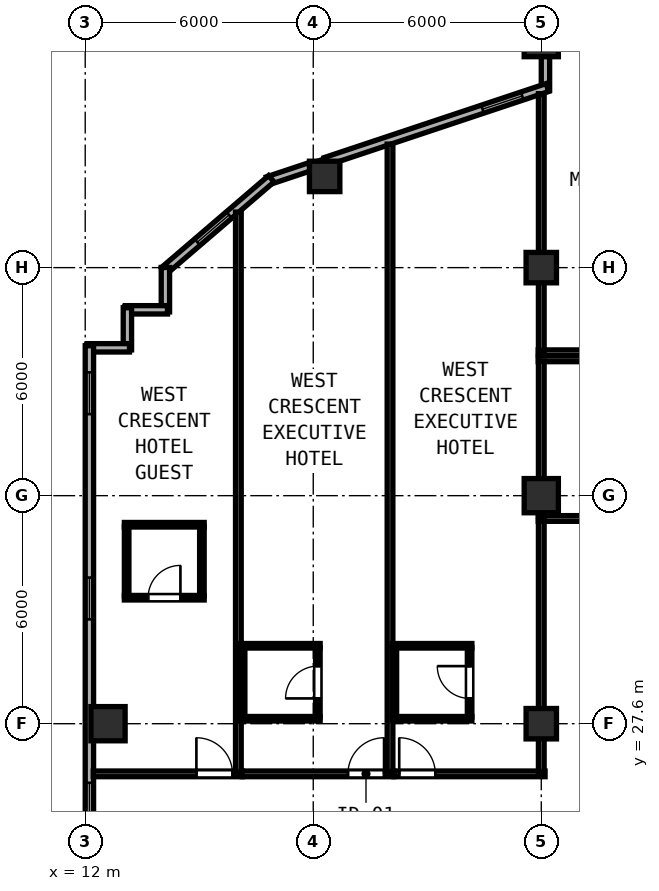
"""IFC4 building model, lengths in metres.
Left out: names, types, materials, properties, quantities, classifications, styles, units other than length and angle.
Written with IfcOpenShell. Run it as: python <this file> out.ifc"""

import sys

from ifc_helpers import new_model, si_unit, direction, frame, frame_2d, origin, origin_2d, place, context, subcontext, project, spatial, rectangle, hollow_rectangle, extrude, element, fill, save


model = new_model("IFC4")
c1 = context("Model", 3, precision=1e-05, world=origin(), true_north=direction((0.0, 1.0)))
c2 = subcontext(c1, "Body", "Model", "MODEL_VIEW")
j1 = project(units=[si_unit("LENGTHUNIT", "METRE"), si_unit("PLANEANGLEUNIT", "RADIAN")], contexts=[c1])
p1 = place(None, origin())
s1 = spatial("IfcSite", under=j1, at=p1, CompositionType="ELEMENT")
p2 = place(p1, origin())
s2 = spatial("IfcBuilding", under=s1, at=p2, CompositionType="ELEMENT")
p3 = place(p2, frame((0.0, 0.0, 191.8)))
s3 = spatial("IfcBuildingStorey", under=s2, at=p3, CompositionType="ELEMENT", Elevation=191.8)
for number, where, z_axis, x_axis in (
    (1, (24.0, 33.6, 0.0), (0.0, 0.0, 1.0), (1.0, 0.0, 0.0)),
    (2, (24.0, 45.6, 0.0), (0.0, 0.0, 1.0), (1.0, 0.0, 0.0)),
    (3, (12.6, 27.6, 0.0), (0.0, 0.0, 1.0), (1.0, 0.0, 0.0)),
):
    element("IfcColumn", number, at=place(p3, frame(where, z_axis=z_axis, x_axis=x_axis)), inside=s3, PredefinedType="COLUMN", context=c2, shape_type="SweptSolid", body=[
        extrude(hollow_rectangle(XDim=0.9, YDim=0.9, WallThickness=0.034, at=origin_2d()), origin(), (0.0, 0.0, 1.0), 3.8),
    ])
for number, where, z_axis, x_axis in (
    (4, (24.0, 27.6, 0.0), (0.0, 0.0, 1.0), (1.0, 0.0, 0.0)),
    (5, (24.0, 39.6, 0.0), (0.0, 0.0, 1.0), (1.0, 0.0, 0.0)),
    (6, (18.3, 42.0, 0.0), (0.0, 0.0, 1.0), (1.0, 0.0, 0.0)),
):
    element("IfcColumn", number, at=place(p3, frame(where, z_axis=z_axis, x_axis=x_axis)), inside=s3, PredefinedType="COLUMN", context=c2, shape_type="SweptSolid", body=[
        extrude(hollow_rectangle(XDim=0.8, YDim=0.8, WallThickness=0.03, at=origin_2d()), origin(), (0.0, 0.0, 1.0), 3.8),
    ])
p4 = place(p3, frame((24.11, 45.158, 0.0), z_axis=(0.0, 0.0, 1.0), x_axis=(0.0, -1.0, 0.0)))
e7 = element("IfcWall", 7, at=p4, inside=s3, PredefinedType="SOLIDWALL", context=c2, shape_type="SweptSolid", body=[
    extrude(rectangle(XDim=0.892, YDim=0.22, at=frame_2d((0.446, 0.0))), origin(), (0.0, 0.0, 1.0), 3.215),
])
p5 = place(p3, frame((24.162, 44.338, 0.0), z_axis=(0.0, 0.0, 1.0), x_axis=(-0.948687265055, -0.316215864755, 0.0)))
e8 = element("IfcWall", 8, at=p5, inside=s3, PredefinedType="SOLIDWALL", context=c2, shape_type="SweptSolid", body=[
    extrude(rectangle(XDim=6.154, YDim=0.22, at=frame_2d((3.077, 0.0))), origin(), (0.0, 0.0, 1.0), 3.215),
])
p6 = place(p5, frame((0.7, 0.0, 0.85)))
e9 = element("IfcOpeningElement", 9, at=p6, cuts=e8, PredefinedType="OPENING", context=c2, shape_type="SweptSolid", body=[
    extrude(rectangle(XDim=1.1, YDim=1.75, at=frame_2d((0.55, 0.875))), frame((0.0, 0.12, 0.0), z_axis=(0.0, -1.0, 0.0), x_axis=(1.0, 0.0, 0.0)), (0.0, 0.0, 1.0), 0.24),
])
p7 = place(p3, frame((17.908, 42.253, 0.0), z_axis=(0.0, 0.0, 1.0), x_axis=(-0.948662335685, -0.316290646166, 0.0)))
e10 = element("IfcWall", 10, at=p7, inside=s3, PredefinedType="SOLIDWALL", context=c2, shape_type="SweptSolid", body=[
    extrude(rectangle(XDim=1.165, YDim=0.22, at=frame_2d((0.583, 0.0))), origin(), (0.0, 0.0, 1.0), 3.62),
])
p8 = place(p3, frame((16.897, 41.938, 0.0), z_axis=(0.0, 0.0, 1.0), x_axis=(-0.759279729622, -0.650764390686, 0.0)))
e11 = element("IfcWall", 11, at=p8, inside=s3, PredefinedType="SOLIDWALL", context=c2, shape_type="SweptSolid", body=[
    extrude(rectangle(XDim=3.726, YDim=0.22, at=frame_2d((1.863, 0.0))), origin(), (0.0, 0.0, 1.0), 3.62),
])
p9 = place(p8, frame((1.464, 0.0, 0.85)))
e12 = element("IfcOpeningElement", 12, at=p9, cuts=e11, PredefinedType="OPENING", context=c2, shape_type="SweptSolid", body=[
    extrude(rectangle(XDim=1.1, YDim=1.75, at=frame_2d((0.55, 0.875))), frame((0.0, 0.12, 0.0), z_axis=(0.0, -1.0, 0.0), x_axis=(1.0, 0.0, 0.0)), (0.0, 0.0, 1.0), 0.24),
])
p10 = place(p3, frame((14.11, 39.604, 0.0), z_axis=(0.0, 0.0, 1.0), x_axis=(0.0, -1.0, 0.0)))
e13 = element("IfcWall", 13, at=p10, inside=s3, PredefinedType="SOLIDWALL", context=c2, shape_type="SweptSolid", body=[
    extrude(rectangle(XDim=1.169, YDim=0.22, at=frame_2d((0.585, 0.0))), origin(), (0.0, 0.0, 1.0), 3.62),
])
p11 = place(p3, frame((14.165, 38.49, 0.0), z_axis=(0.0, 0.0, 1.0), x_axis=(-1.0, 0.0, 0.0)))
e14 = element("IfcWall", 14, at=p11, inside=s3, PredefinedType="SOLIDWALL", context=c2, shape_type="SweptSolid", body=[
    extrude(rectangle(XDim=1.11, YDim=0.22, at=frame_2d((0.555, 0.0))), origin(), (0.0, 0.0, 1.0), 3.62),
])
p12 = place(p3, frame((13.11, 38.545, 0.0), z_axis=(0.0, 0.0, 1.0), x_axis=(0.0, -1.0, 0.0)))
e15 = element("IfcWall", 15, at=p12, inside=s3, PredefinedType="SOLIDWALL", context=c2, shape_type="SweptSolid", body=[
    extrude(rectangle(XDim=1.11, YDim=0.22, at=frame_2d((0.555, 0.0))), origin(), (0.0, 0.0, 1.0), 3.62),
])
p13 = place(p3, frame((13.165, 37.49, 0.0), z_axis=(0.0, 0.0, 1.0), x_axis=(-1.0, 0.0, 0.0)))
e16 = element("IfcWall", 16, at=p13, inside=s3, PredefinedType="SOLIDWALL", context=c2, shape_type="SweptSolid", body=[
    extrude(rectangle(XDim=1.11, YDim=0.22, at=frame_2d((0.555, 0.0))), origin(), (0.0, 0.0, 1.0), 3.62),
])
p14 = place(p3, frame((12.11, 37.545, 0.0), z_axis=(0.0, 0.0, 1.0), x_axis=(0.0, -1.0, 0.0)))
e17 = element("IfcWall", 17, at=p14, inside=s3, PredefinedType="SOLIDWALL", context=c2, shape_type="SweptSolid", body=[
    extrude(rectangle(XDim=21.145, YDim=0.22, at=frame_2d((10.573, 0.0))), origin(), (0.0, 0.0, 1.0), 3.62),
])
p15 = place(p14, frame((0.7, 0.0, 0.85)))
e18 = element("IfcOpeningElement", 18, at=p15, cuts=e17, PredefinedType="OPENING", context=c2, shape_type="SweptSolid", body=[
    extrude(rectangle(XDim=1.1, YDim=1.75, at=frame_2d((0.55, 0.875))), frame((0.0, 0.12, 0.0), z_axis=(0.0, -1.0, 0.0), x_axis=(1.0, 0.0, 0.0)), (0.0, 0.0, 1.0), 0.24),
])
p16 = place(p14, frame((6.1, 0.0, 0.85)))
e19 = element("IfcOpeningElement", 19, at=p16, cuts=e17, PredefinedType="OPENING", context=c2, shape_type="SweptSolid", body=[
    extrude(rectangle(XDim=1.1, YDim=1.75, at=frame_2d((0.55, 0.875))), frame((0.0, 0.12, 0.0), z_axis=(0.0, -1.0, 0.0), x_axis=(1.0, 0.0, 0.0)), (0.0, 0.0, 1.0), 0.24),
])
p17 = place(p14, frame((11.5, 0.0, 0.85)))
e20 = element("IfcOpeningElement", 20, at=p17, cuts=e17, PredefinedType="OPENING", context=c2, shape_type="SweptSolid", body=[
    extrude(rectangle(XDim=1.1, YDim=1.75, at=frame_2d((0.55, 0.875))), frame((0.0, 0.12, 0.0), z_axis=(0.0, -1.0, 0.0), x_axis=(1.0, 0.0, 0.0)), (0.0, 0.0, 1.0), 0.24),
])
p18 = place(p14, frame((16.9, 0.0, 0.85)))
e21 = element("IfcOpeningElement", 21, at=p18, cuts=e17, PredefinedType="OPENING", context=c2, shape_type="SweptSolid", body=[
    extrude(rectangle(XDim=1.1, YDim=1.75, at=frame_2d((0.55, 0.875))), frame((0.0, 0.12, 0.0), z_axis=(0.0, -1.0, 0.0), x_axis=(1.0, 0.0, 0.0)), (0.0, 0.0, 1.0), 0.24),
])
for number, where, z_axis, x_axis in (
    (22, (23.92, 37.2, 0.0), (0.0, 0.0, 1.0), (1.0, 0.0, 0.0)),
    (23, (23.92, 33.0, 0.0), (0.0, 0.0, 1.0), (1.0, 0.0, 0.0)),
):
    element("IfcWall", number, at=place(p3, frame(where, z_axis=z_axis, x_axis=x_axis)), inside=s3, PredefinedType="PARTITIONING", context=c2, shape_type="SweptSolid", body=[
        extrude(rectangle(XDim=3.8, YDim=0.15, at=frame_2d((1.9, 0.0))), origin(), (0.0, 0.0, 1.0), 3.62),
    ])
p19 = place(p3, frame((24.0, 33.06, 0.0), z_axis=(0.0, 0.0, 1.0), x_axis=(0.0, 1.0, 0.0)))
e24 = element("IfcWall", 24, at=p19, inside=s3, PredefinedType="PARTITIONING", context=c2, shape_type="SweptSolid", body=[
    extrude(rectangle(XDim=4.08, YDim=0.15, at=frame_2d((2.04, 0.0))), origin(), (0.0, 0.0, 1.0), 3.215),
])
p20 = place(p3, frame((23.92, 37.36, 0.0), z_axis=(0.0, 0.0, 1.0), x_axis=(1.0, 0.0, 0.0)))
e25 = element("IfcWall", 25, at=p20, inside=s3, PredefinedType="PARTITIONING", context=c2, shape_type="SweptSolid", body=[
    extrude(rectangle(XDim=3.8, YDim=0.15, at=frame_2d((1.9, 0.0))), origin(), (0.0, 0.0, 1.0), 3.62),
])
p21 = place(p3, frame((24.0, 37.42, 0.0), z_axis=(0.0, 0.0, 1.0), x_axis=(0.0, 1.0, 0.0)))
e26 = element("IfcWall", 26, at=p21, inside=s3, PredefinedType="PARTITIONING", context=c2, shape_type="SweptSolid", body=[
    extrude(rectangle(XDim=6.757, YDim=0.15, at=frame_2d((3.378, 0.0))), origin(), (0.0, 0.0, 1.0), 3.215),
])
p22 = place(p3, frame((12.212, 26.28, 0.0), z_axis=(0.0, 0.0, 1.0), x_axis=(1.0, 0.0, 0.0)))
e27 = element("IfcWall", 27, at=p22, inside=s3, PredefinedType="PARTITIONING", context=c2, shape_type="SweptSolid", body=[
    extrude(rectangle(XDim=3.918, YDim=0.15, at=frame_2d((1.959, 0.0))), origin(), (0.0, 0.0, 1.0), 3.62),
])
p23 = place(p22, frame((2.713, 0.0, 0.0)))
e28 = element("IfcOpeningElement", 28, at=p23, cuts=e27, PredefinedType="OPENING", context=c2, shape_type="SweptSolid", body=[
    extrude(rectangle(XDim=0.95, YDim=2.15, at=frame_2d((0.475, 1.075))), frame((0.0, 0.085, 0.0), z_axis=(0.0, -1.0, 0.0), x_axis=(1.0, 0.0, 0.0)), (0.0, 0.0, 1.0), 0.17),
])
p24 = place(p3, frame((16.03, 26.34, 0.0), z_axis=(0.0, 0.0, 1.0), x_axis=(0.0, 1.0, 0.0)))
e29 = element("IfcWall", 29, at=p24, inside=s3, PredefinedType="PARTITIONING", context=c2, shape_type="SweptSolid", body=[
    extrude(rectangle(XDim=14.721, YDim=0.15, at=frame_2d((7.36, 0.0))), origin(), (0.0, 0.0, 1.0), 3.62),
])
p25 = place(p3, frame((13.03, 32.835, 0.0), z_axis=(0.0, 0.0, 1.0), x_axis=(1.0, 0.0, 0.0)))
e30 = element("IfcWall", 30, at=p25, inside=s3, PredefinedType="PARTITIONING", context=c2, shape_type="SweptSolid", body=[
    extrude(rectangle(XDim=2.1, YDim=0.12, at=frame_2d((1.05, 0.0))), origin(), (0.0, 0.0, 1.0), 3.62),
])
p26 = place(p3, frame((13.03, 30.915, 0.0), z_axis=(0.0, 0.0, 1.0), x_axis=(1.0, 0.0, 0.0)))
e31 = element("IfcWall", 31, at=p26, inside=s3, PredefinedType="PARTITIONING", context=c2, shape_type="SweptSolid", body=[
    extrude(rectangle(XDim=2.1, YDim=0.12, at=frame_2d((1.05, 0.0))), origin(), (0.0, 0.0, 1.0), 3.62),
])
p27 = place(p26, frame((0.625, 0.0, 0.0)))
e32 = element("IfcOpeningElement", 32, at=p27, cuts=e31, PredefinedType="OPENING", context=c2, shape_type="SweptSolid", body=[
    extrude(rectangle(XDim=0.85, YDim=2.1, at=frame_2d((0.425, 1.05))), frame((0.0, 0.07, 0.0), z_axis=(0.0, -1.0, 0.0), x_axis=(1.0, 0.0, 0.0)), (0.0, 0.0, 1.0), 0.14),
])
for number, where, z_axis, x_axis in (
    (33, (13.09, 30.96, 0.0), (0.0, 0.0, 1.0), (0.0, 1.0, 0.0)),
    (34, (15.07, 30.96, 0.0), (0.0, 0.0, 1.0), (0.0, 1.0, 0.0)),
):
    element("IfcWall", number, at=place(p3, frame(where, z_axis=z_axis, x_axis=x_axis)), inside=s3, PredefinedType="PARTITIONING", context=c2, shape_type="SweptSolid", body=[
        extrude(rectangle(XDim=1.83, YDim=0.12, at=frame_2d((0.915, 0.0))), origin(), (0.0, 0.0, 1.0), 3.62),
    ])
p28 = place(p3, frame((16.132, 26.28, 0.0), z_axis=(0.0, 0.0, 1.0), x_axis=(1.0, 0.0, 0.0)))
e35 = element("IfcWall", 35, at=p28, inside=s3, PredefinedType="PARTITIONING", context=c2, shape_type="SweptSolid", body=[
    extrude(rectangle(XDim=3.988, YDim=0.15, at=frame_2d((1.994, 0.0))), origin(), (0.0, 0.0, 1.0), 3.62),
])
p29 = place(p28, frame((2.781, 0.0, 0.0)))
e36 = element("IfcOpeningElement", 36, at=p29, cuts=e35, PredefinedType="OPENING", context=c2, shape_type="SweptSolid", body=[
    extrude(rectangle(XDim=0.95, YDim=2.18, at=frame_2d((0.475, 1.09))), frame((0.0, 0.085, 0.0), z_axis=(0.0, -1.0, 0.0), x_axis=(1.0, 0.0, 0.0)), (0.0, 0.0, 1.0), 0.17),
])
p30 = place(p3, frame((20.02, 26.34, 0.0), z_axis=(0.0, 0.0, 1.0), x_axis=(0.0, 1.0, 0.0)))
e37 = element("IfcWall", 37, at=p30, inside=s3, PredefinedType="PARTITIONING", context=c2, shape_type="SweptSolid", body=[
    extrude(rectangle(XDim=16.51, YDim=0.15, at=frame_2d((8.255, 0.0))), origin(), (0.0, 0.0, 1.0), 3.62),
])
p31 = place(p3, frame((16.09, 29.65, 0.0), z_axis=(0.0, 0.0, 1.0), x_axis=(1.0, 0.0, 0.0)))
e38 = element("IfcWall", 38, at=p31, inside=s3, PredefinedType="PARTITIONING", context=c2, shape_type="SweptSolid", body=[
    extrude(rectangle(XDim=2.091, YDim=0.12, at=frame_2d((1.046, 0.0))), origin(), (0.0, 0.0, 1.0), 3.62),
])
p32 = place(p3, frame((16.09, 27.73, 0.0), z_axis=(0.0, 0.0, 1.0), x_axis=(1.0, 0.0, 0.0)))
e39 = element("IfcWall", 39, at=p32, inside=s3, PredefinedType="PARTITIONING", context=c2, shape_type="SweptSolid", body=[
    extrude(rectangle(XDim=2.091, YDim=0.12, at=frame_2d((1.046, 0.0))), origin(), (0.0, 0.0, 1.0), 3.215),
])
p33 = place(p3, frame((16.141, 27.775, 0.0), z_axis=(0.0, 0.0, 1.0), x_axis=(0.0, 1.0, 0.0)))
e40 = element("IfcWall", 40, at=p33, inside=s3, PredefinedType="PARTITIONING", context=c2, shape_type="SweptSolid", body=[
    extrude(rectangle(XDim=1.83, YDim=0.12, at=frame_2d((0.915, 0.0))), origin(), (0.0, 0.0, 1.0), 3.62),
])
p34 = place(p3, frame((18.121, 27.775, 0.0), z_axis=(0.0, 0.0, 1.0), x_axis=(0.0, 1.0, 0.0)))
e41 = element("IfcWall", 41, at=p34, inside=s3, PredefinedType="PARTITIONING", context=c2, shape_type="SweptSolid", body=[
    extrude(rectangle(XDim=1.83, YDim=0.12, at=frame_2d((0.915, 0.0))), origin(), (0.0, 0.0, 1.0), 3.62),
])
p35 = place(p34, frame((0.49, 0.0, 0.0)))
e42 = element("IfcOpeningElement", 42, at=p35, cuts=e41, PredefinedType="OPENING", context=c2, shape_type="SweptSolid", body=[
    extrude(rectangle(XDim=0.85, YDim=2.1, at=frame_2d((0.425, 1.05))), frame((0.0, 0.07, 0.0), z_axis=(0.0, -1.0, 0.0), x_axis=(1.0, 0.0, 0.0)), (0.0, 0.0, 1.0), 0.14),
])
p36 = place(p3, frame((20.122, 26.28, 0.0), z_axis=(0.0, 0.0, 1.0), x_axis=(1.0, 0.0, 0.0)))
e43 = element("IfcWall", 43, at=p36, inside=s3, PredefinedType="PARTITIONING", context=c2, shape_type="SweptSolid", body=[
    extrude(rectangle(XDim=3.978, YDim=0.15, at=frame_2d((1.989, 0.0))), origin(), (0.0, 0.0, 1.0), 3.62),
])
p37 = place(p36, frame((0.14, 0.0, 0.0)))
e44 = element("IfcOpeningElement", 44, at=p37, cuts=e43, PredefinedType="OPENING", context=c2, shape_type="SweptSolid", body=[
    extrude(rectangle(XDim=0.95, YDim=2.18, at=frame_2d((0.475, 1.09))), frame((0.0, 0.085, 0.0), z_axis=(0.0, -1.0, 0.0), x_axis=(1.0, 0.0, 0.0)), (0.0, 0.0, 1.0), 0.17),
])
p38 = place(p3, frame((24.0, 26.34, 0.0), z_axis=(0.0, 0.0, 1.0), x_axis=(0.0, 1.0, 0.0)))
e45 = element("IfcWall", 45, at=p38, inside=s3, PredefinedType="PARTITIONING", context=c2, shape_type="SweptSolid", body=[
    extrude(rectangle(XDim=6.6, YDim=0.15, at=frame_2d((3.3, 0.0))), origin(), (0.0, 0.0, 1.0), 3.215),
])
p39 = place(p3, frame((20.08, 29.65, 0.0), z_axis=(0.0, 0.0, 1.0), x_axis=(1.0, 0.0, 0.0)))
e46 = element("IfcWall", 46, at=p39, inside=s3, PredefinedType="PARTITIONING", context=c2, shape_type="SweptSolid", body=[
    extrude(rectangle(XDim=2.094, YDim=0.12, at=frame_2d((1.047, 0.0))), origin(), (0.0, 0.0, 1.0), 3.62),
])
p40 = place(p3, frame((20.08, 27.73, 0.0), z_axis=(0.0, 0.0, 1.0), x_axis=(1.0, 0.0, 0.0)))
e47 = element("IfcWall", 47, at=p40, inside=s3, PredefinedType="PARTITIONING", context=c2, shape_type="SweptSolid", body=[
    extrude(rectangle(XDim=2.094, YDim=0.12, at=frame_2d((1.047, 0.0))), origin(), (0.0, 0.0, 1.0), 3.215),
])
p41 = place(p3, frame((20.134, 27.775, 0.0), z_axis=(0.0, 0.0, 1.0), x_axis=(0.0, 1.0, 0.0)))
e48 = element("IfcWall", 48, at=p41, inside=s3, PredefinedType="PARTITIONING", context=c2, shape_type="SweptSolid", body=[
    extrude(rectangle(XDim=1.83, YDim=0.12, at=frame_2d((0.915, 0.0))), origin(), (0.0, 0.0, 1.0), 3.62),
])
p42 = place(p3, frame((22.114, 27.775, 0.0), z_axis=(0.0, 0.0, 1.0), x_axis=(0.0, 1.0, 0.0)))
e49 = element("IfcWall", 49, at=p42, inside=s3, PredefinedType="PARTITIONING", context=c2, shape_type="SweptSolid", body=[
    extrude(rectangle(XDim=1.83, YDim=0.12, at=frame_2d((0.915, 0.0))), origin(), (0.0, 0.0, 1.0), 3.62),
])
p43 = place(p42, frame((0.49, 0.0, 0.0)))
e50 = element("IfcOpeningElement", 50, at=p43, cuts=e49, PredefinedType="OPENING", context=c2, shape_type="SweptSolid", body=[
    extrude(rectangle(XDim=0.85, YDim=2.1, at=frame_2d((0.425, 1.05))), frame((0.0, 0.07, 0.0), z_axis=(0.0, -1.0, 0.0), x_axis=(1.0, 0.0, 0.0)), (0.0, 0.0, 1.0), 0.14),
])
p44 = place(p6, origin())
e51 = element("IfcWindow", 51, at=p44, inside=s3, PartitioningType="SINGLE_PANEL", PredefinedType="WINDOW", context=c2, shape_type="SweptSolid", body=[
    extrude(rectangle(XDim=1.1, YDim=1.75, at=frame_2d((0.55, 0.875))), frame((0.0, 0.03, 0.0), z_axis=(0.0, -1.0, 0.0), x_axis=(1.0, 0.0, 0.0)), (0.0, 0.0, 1.0), 0.06),
])
fill(e9, e51)
p45 = place(p9, origin())
e52 = element("IfcWindow", 52, at=p45, inside=s3, PartitioningType="SINGLE_PANEL", PredefinedType="WINDOW", context=c2, shape_type="SweptSolid", body=[
    extrude(rectangle(XDim=1.1, YDim=1.75, at=frame_2d((0.55, 0.875))), frame((0.0, 0.03, 0.0), z_axis=(0.0, -1.0, 0.0), x_axis=(1.0, 0.0, 0.0)), (0.0, 0.0, 1.0), 0.06),
])
fill(e12, e52)
p46 = place(p15, origin())
e53 = element("IfcWindow", 53, at=p46, inside=s3, PartitioningType="SINGLE_PANEL", PredefinedType="WINDOW", context=c2, shape_type="SweptSolid", body=[
    extrude(rectangle(XDim=1.1, YDim=1.75, at=frame_2d((0.55, 0.875))), frame((0.0, 0.03, 0.0), z_axis=(0.0, -1.0, 0.0), x_axis=(1.0, 0.0, 0.0)), (0.0, 0.0, 1.0), 0.06),
])
fill(e18, e53)
p47 = place(p16, origin())
e54 = element("IfcWindow", 54, at=p47, inside=s3, PartitioningType="SINGLE_PANEL", PredefinedType="WINDOW", context=c2, shape_type="SweptSolid", body=[
    extrude(rectangle(XDim=1.1, YDim=1.75, at=frame_2d((0.55, 0.875))), frame((0.0, 0.03, 0.0), z_axis=(0.0, -1.0, 0.0), x_axis=(1.0, 0.0, 0.0)), (0.0, 0.0, 1.0), 0.06),
])
fill(e19, e54)
p48 = place(p17, origin())
e55 = element("IfcWindow", 55, at=p48, inside=s3, PartitioningType="SINGLE_PANEL", PredefinedType="WINDOW", context=c2, shape_type="SweptSolid", body=[
    extrude(rectangle(XDim=1.1, YDim=1.75, at=frame_2d((0.55, 0.875))), frame((0.0, 0.03, 0.0), z_axis=(0.0, -1.0, 0.0), x_axis=(1.0, 0.0, 0.0)), (0.0, 0.0, 1.0), 0.06),
])
fill(e20, e55)
p49 = place(p23, origin())
e56 = element("IfcDoor", 56, at=p49, inside=s3, OperationType="SINGLE_SWING_LEFT", PredefinedType="DOOR", context=c2, shape_type="SweptSolid", body=[
    extrude(rectangle(XDim=0.95, YDim=2.15, at=frame_2d((0.475, 1.075))), frame((0.0, 0.025, 0.0), z_axis=(0.0, -1.0, 0.0), x_axis=(1.0, 0.0, 0.0)), (0.0, 0.0, 1.0), 0.05),
])
fill(e28, e56)
p50 = place(p27, origin())
e57 = element("IfcDoor", 57, at=p50, inside=s3, OperationType="SINGLE_SWING_RIGHT", PredefinedType="DOOR", context=c2, shape_type="SweptSolid", body=[
    extrude(rectangle(XDim=0.85, YDim=2.1, at=frame_2d((0.425, 1.05))), frame((0.0, 0.025, 0.0), z_axis=(0.0, -1.0, 0.0), x_axis=(1.0, 0.0, 0.0)), (0.0, 0.0, 1.0), 0.05),
])
fill(e32, e57)
p51 = place(p29, origin())
e58 = element("IfcDoor", 58, at=p51, inside=s3, OperationType="SINGLE_SWING_RIGHT", PredefinedType="DOOR", context=c2, shape_type="SweptSolid", body=[
    extrude(rectangle(XDim=0.95, YDim=2.18, at=frame_2d((0.475, 1.09))), frame((0.0, 0.025, 0.0), z_axis=(0.0, -1.0, 0.0), x_axis=(1.0, 0.0, 0.0)), (0.0, 0.0, 1.0), 0.05),
])
fill(e36, e58)
p52 = place(p35, origin())
e59 = element("IfcDoor", 59, at=p52, inside=s3, OperationType="SINGLE_SWING_LEFT", PredefinedType="DOOR", context=c2, shape_type="SweptSolid", body=[
    extrude(rectangle(XDim=0.85, YDim=2.1, at=frame_2d((0.425, 1.05))), frame((0.0, 0.025, 0.0), z_axis=(0.0, -1.0, 0.0), x_axis=(1.0, 0.0, 0.0)), (0.0, 0.0, 1.0), 0.05),
])
fill(e42, e59)
p53 = place(p37, origin())
e60 = element("IfcDoor", 60, at=p53, inside=s3, OperationType="SINGLE_SWING_LEFT", PredefinedType="DOOR", context=c2, shape_type="SweptSolid", body=[
    extrude(rectangle(XDim=0.95, YDim=2.18, at=frame_2d((0.475, 1.09))), frame((0.0, 0.025, 0.0), z_axis=(0.0, -1.0, 0.0), x_axis=(1.0, 0.0, 0.0)), (0.0, 0.0, 1.0), 0.05),
])
fill(e44, e60)
p54 = place(p43, origin())
e61 = element("IfcDoor", 61, at=p54, inside=s3, OperationType="SINGLE_SWING_RIGHT", PredefinedType="DOOR", context=c2, shape_type="SweptSolid", body=[
    extrude(rectangle(XDim=0.85, YDim=2.1, at=frame_2d((0.425, 1.05))), frame((0.0, 0.025, 0.0), z_axis=(0.0, -1.0, 0.0), x_axis=(1.0, 0.0, 0.0)), (0.0, 0.0, 1.0), 0.05),
])
fill(e50, e61)
save(model, sys.argv[1])
